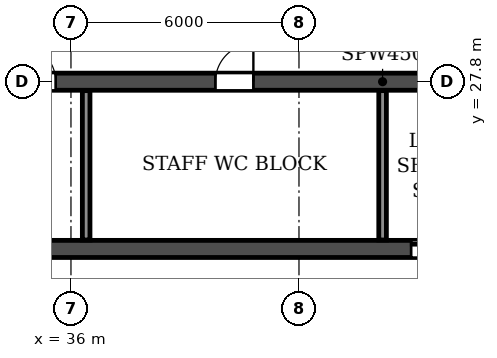
"""IFC4 building model, lengths in metres.
Left out: names, types, materials, properties, quantities, classifications, styles, units other than length and angle.
Written with IfcOpenShell. Run it as: python <this file> out.ifc"""

import sys

from ifc_helpers import new_model, si_unit, direction, frame, frame_2d, origin, place, context, subcontext, project, spatial, rectangle, extrude, element, fill, save


model = new_model("IFC4")
c1 = context("Model", 3, precision=1e-05, world=origin(), true_north=direction((0.0, 1.0)))
c2 = subcontext(c1, "Body", "Model", "MODEL_VIEW")
j1 = project(units=[si_unit("LENGTHUNIT", "METRE"), si_unit("PLANEANGLEUNIT", "RADIAN")], contexts=[c1])
p1 = place(None, origin())
s1 = spatial("IfcSite", under=j1, at=p1, CompositionType="ELEMENT")
p2 = place(p1, origin())
s2 = spatial("IfcBuilding", under=s1, at=p2, CompositionType="ELEMENT")
p3 = place(p2, frame((0.0, 0.0, 15.0)))
s3 = spatial("IfcBuildingStorey", under=s2, at=p3, CompositionType="ELEMENT", Elevation=15.0)
p4 = place(p3, frame((18.0, 27.8, 0.0), z_axis=(0.0, 0.0, 1.0), x_axis=(1.0, 0.0, 0.0)))
e1 = element("IfcWall", 1, at=p4, inside=s3, PredefinedType="SOLIDWALL", context=c2, shape_type="SweptSolid", body=[
    extrude(rectangle(XDim=66.0, YDim=0.45, at=frame_2d((33.0, 0.0))), origin(), (0.0, 0.0, 1.0), 3.92),
])
p5 = place(p4, frame((0.9, 0.0, 0.0)))
e2 = element("IfcOpeningElement", 2, at=p5, cuts=e1, PredefinedType="OPENING", context=c2, shape_type="SweptSolid", body=[
    extrude(rectangle(XDim=1.0, YDim=2.1, at=frame_2d((0.5, 1.05))), frame((0.0, 0.235, 0.0), z_axis=(0.0, -1.0, 0.0), x_axis=(1.0, 0.0, 0.0)), (0.0, 0.0, 1.0), 0.47),
])
p6 = place(p4, frame((4.25, 0.0, 0.0)))
e3 = element("IfcOpeningElement", 3, at=p6, cuts=e1, PredefinedType="OPENING", context=c2, shape_type="SweptSolid", body=[
    extrude(rectangle(XDim=0.9, YDim=2.1, at=frame_2d((0.45, 1.05))), frame((0.0, 0.235, 0.0), z_axis=(0.0, -1.0, 0.0), x_axis=(1.0, 0.0, 0.0)), (0.0, 0.0, 1.0), 0.47),
])
p7 = place(p4, frame((8.85, 0.0, 0.0)))
e4 = element("IfcOpeningElement", 4, at=p7, cuts=e1, PredefinedType="OPENING", context=c2, shape_type="SweptSolid", body=[
    extrude(rectangle(XDim=0.9, YDim=2.1, at=frame_2d((0.45, 1.05))), frame((0.0, 0.235, 0.0), z_axis=(0.0, -1.0, 0.0), x_axis=(1.0, 0.0, 0.0)), (0.0, 0.0, 1.0), 0.47),
])
p8 = place(p4, frame((13.45, 0.0, 0.0)))
e5 = element("IfcOpeningElement", 5, at=p8, cuts=e1, PredefinedType="OPENING", context=c2, shape_type="SweptSolid", body=[
    extrude(rectangle(XDim=0.9, YDim=2.1, at=frame_2d((0.45, 1.05))), frame((0.0, 0.235, 0.0), z_axis=(0.0, -1.0, 0.0), x_axis=(1.0, 0.0, 0.0)), (0.0, 0.0, 1.0), 0.47),
])
p9 = place(p4, frame((16.6, 0.0, 0.0)))
e6 = element("IfcOpeningElement", 6, at=p9, cuts=e1, PredefinedType="OPENING", context=c2, shape_type="SweptSolid", body=[
    extrude(rectangle(XDim=1.0, YDim=2.1, at=frame_2d((0.5, 1.05))), frame((0.0, 0.235, 0.0), z_axis=(0.0, -1.0, 0.0), x_axis=(1.0, 0.0, 0.0)), (0.0, 0.0, 1.0), 0.47),
])
p10 = place(p4, frame((21.8, 0.0, 0.0)))
e7 = element("IfcOpeningElement", 7, at=p10, cuts=e1, PredefinedType="OPENING", context=c2, shape_type="SweptSolid", body=[
    extrude(rectangle(XDim=1.0, YDim=2.1, at=frame_2d((0.5, 1.05))), frame((0.0, 0.235, 0.0), z_axis=(0.0, -1.0, 0.0), x_axis=(1.0, 0.0, 0.0)), (0.0, 0.0, 1.0), 0.47),
])
p11 = place(p4, frame((29.6, 0.0, 0.0)))
e8 = element("IfcOpeningElement", 8, at=p11, cuts=e1, PredefinedType="OPENING", context=c2, shape_type="SweptSolid", body=[
    extrude(rectangle(XDim=1.0, YDim=2.1, at=frame_2d((0.5, 1.05))), frame((0.0, 0.235, 0.0), z_axis=(0.0, -1.0, 0.0), x_axis=(1.0, 0.0, 0.0)), (0.0, 0.0, 1.0), 0.47),
])
p12 = place(p4, frame((32.5, 0.0, 0.0)))
e9 = element("IfcOpeningElement", 9, at=p12, cuts=e1, PredefinedType="OPENING", context=c2, shape_type="SweptSolid", body=[
    extrude(rectangle(XDim=1.0, YDim=2.1, at=frame_2d((0.5, 1.05))), frame((0.0, 0.235, 0.0), z_axis=(0.0, -1.0, 0.0), x_axis=(1.0, 0.0, 0.0)), (0.0, 0.0, 1.0), 0.47),
])
p13 = place(p4, frame((35.4, 0.0, 0.0)))
e10 = element("IfcOpeningElement", 10, at=p13, cuts=e1, PredefinedType="OPENING", context=c2, shape_type="SweptSolid", body=[
    extrude(rectangle(XDim=1.0, YDim=2.1, at=frame_2d((0.5, 1.05))), frame((0.0, 0.235, 0.0), z_axis=(0.0, -1.0, 0.0), x_axis=(1.0, 0.0, 0.0)), (0.0, 0.0, 1.0), 0.47),
])
p14 = place(p4, frame((39.3, 0.0, 0.0)))
e11 = element("IfcOpeningElement", 11, at=p14, cuts=e1, PredefinedType="OPENING", context=c2, shape_type="SweptSolid", body=[
    extrude(rectangle(XDim=1.0, YDim=2.1, at=frame_2d((0.5, 1.05))), frame((0.0, 0.235, 0.0), z_axis=(0.0, -1.0, 0.0), x_axis=(1.0, 0.0, 0.0)), (0.0, 0.0, 1.0), 0.47),
])
p15 = place(p4, frame((43.2, 0.0, 0.0)))
e12 = element("IfcOpeningElement", 12, at=p15, cuts=e1, PredefinedType="OPENING", context=c2, shape_type="SweptSolid", body=[
    extrude(rectangle(XDim=1.0, YDim=2.1, at=frame_2d((0.5, 1.05))), frame((0.0, 0.235, 0.0), z_axis=(0.0, -1.0, 0.0), x_axis=(1.0, 0.0, 0.0)), (0.0, 0.0, 1.0), 0.47),
])
p16 = place(p4, frame((45.8, 0.0, 0.0)))
e13 = element("IfcOpeningElement", 13, at=p16, cuts=e1, PredefinedType="OPENING", context=c2, shape_type="SweptSolid", body=[
    extrude(rectangle(XDim=1.0, YDim=2.1, at=frame_2d((0.5, 1.05))), frame((0.0, 0.235, 0.0), z_axis=(0.0, -1.0, 0.0), x_axis=(1.0, 0.0, 0.0)), (0.0, 0.0, 1.0), 0.47),
])
p17 = place(p4, frame((48.4, 0.0, 0.0)))
e14 = element("IfcOpeningElement", 14, at=p17, cuts=e1, PredefinedType="OPENING", context=c2, shape_type="SweptSolid", body=[
    extrude(rectangle(XDim=1.0, YDim=2.1, at=frame_2d((0.5, 1.05))), frame((0.0, 0.235, 0.0), z_axis=(0.0, -1.0, 0.0), x_axis=(1.0, 0.0, 0.0)), (0.0, 0.0, 1.0), 0.47),
])
p18 = place(p4, frame((51.65, 0.0, 0.0)))
e15 = element("IfcOpeningElement", 15, at=p18, cuts=e1, PredefinedType="OPENING", context=c2, shape_type="SweptSolid", body=[
    extrude(rectangle(XDim=0.9, YDim=2.1, at=frame_2d((0.45, 1.05))), frame((0.0, 0.235, 0.0), z_axis=(0.0, -1.0, 0.0), x_axis=(1.0, 0.0, 0.0)), (0.0, 0.0, 1.0), 0.47),
])
p19 = place(p4, frame((56.2, 0.0, 0.0)))
e16 = element("IfcOpeningElement", 16, at=p19, cuts=e1, PredefinedType="OPENING", context=c2, shape_type="SweptSolid", body=[
    extrude(rectangle(XDim=1.0, YDim=2.1, at=frame_2d((0.5, 1.05))), frame((0.0, 0.235, 0.0), z_axis=(0.0, -1.0, 0.0), x_axis=(1.0, 0.0, 0.0)), (0.0, 0.0, 1.0), 0.47),
])
p20 = place(p4, frame((60.85, 0.0, 0.0)))
e17 = element("IfcOpeningElement", 17, at=p20, cuts=e1, PredefinedType="OPENING", context=c2, shape_type="SweptSolid", body=[
    extrude(rectangle(XDim=0.9, YDim=2.1, at=frame_2d((0.45, 1.05))), frame((0.0, 0.235, 0.0), z_axis=(0.0, -1.0, 0.0), x_axis=(1.0, 0.0, 0.0)), (0.0, 0.0, 1.0), 0.47),
])
p21 = place(p4, frame((64.1, 0.0, 0.0)))
e18 = element("IfcOpeningElement", 18, at=p21, cuts=e1, PredefinedType="OPENING", context=c2, shape_type="SweptSolid", body=[
    extrude(rectangle(XDim=1.0, YDim=2.1, at=frame_2d((0.5, 1.05))), frame((0.0, 0.235, 0.0), z_axis=(0.0, -1.0, 0.0), x_axis=(1.0, 0.0, 0.0)), (0.0, 0.0, 1.0), 0.47),
])
p22 = place(p3, frame((33.925, 23.4, 0.0), z_axis=(0.0, 0.0, 1.0), x_axis=(1.0, 0.0, 0.0)))
e19 = element("IfcWall", 19, at=p22, inside=s3, PredefinedType="SOLIDWALL", context=c2, shape_type="SweptSolid", body=[
    extrude(rectangle(XDim=34.15, YDim=0.45, at=frame_2d((17.075, 0.0))), origin(), (0.0, 0.0, 1.0), 3.92),
])
p23 = place(p22, frame((16.175, 0.0, 0.0)))
e20 = element("IfcOpeningElement", 20, at=p23, cuts=e19, PredefinedType="OPENING", context=c2, shape_type="SweptSolid", body=[
    extrude(rectangle(XDim=1.8, YDim=2.1, at=frame_2d((0.9, 1.05))), frame((0.0, 0.235, 0.0), z_axis=(0.0, -1.0, 0.0), x_axis=(1.0, 0.0, 0.0)), (0.0, 0.0, 1.0), 0.47),
])
p24 = place(p22, frame((11.025, 0.0, 0.0)))
e21 = element("IfcOpeningElement", 21, at=p24, cuts=e19, PredefinedType="OPENING", context=c2, shape_type="SweptSolid", body=[
    extrude(rectangle(XDim=1.1, YDim=2.1, at=frame_2d((0.55, 1.05))), frame((0.0, 0.235, 0.0), z_axis=(0.0, -1.0, 0.0), x_axis=(1.0, 0.0, 0.0)), (0.0, 0.0, 1.0), 0.47),
])
p25 = place(p22, frame((29.825, 0.0, 0.0)))
e22 = element("IfcOpeningElement", 22, at=p25, cuts=e19, PredefinedType="OPENING", context=c2, shape_type="SweptSolid", body=[
    extrude(rectangle(XDim=1.1, YDim=2.1, at=frame_2d((0.55, 1.05))), frame((0.0, 0.235, 0.0), z_axis=(0.0, -1.0, 0.0), x_axis=(1.0, 0.0, 0.0)), (0.0, 0.0, 1.0), 0.47),
])
p26 = place(p22, frame((32.425, 0.0, 0.0)))
e23 = element("IfcOpeningElement", 23, at=p26, cuts=e19, PredefinedType="OPENING", context=c2, shape_type="SweptSolid", body=[
    extrude(rectangle(XDim=1.1, YDim=2.1, at=frame_2d((0.55, 1.05))), frame((0.0, 0.235, 0.0), z_axis=(0.0, -1.0, 0.0), x_axis=(1.0, 0.0, 0.0)), (0.0, 0.0, 1.0), 0.47),
])
for number, where, z_axis, x_axis in (
    (24, (36.4, 23.635, 0.0), (0.0, 0.0, 1.0), (0.0, 1.0, 0.0)),
    (25, (44.2, 23.635, 0.0), (0.0, 0.0, 1.0), (0.0, 1.0, 0.0)),
):
    element("IfcWall", number, at=place(p3, frame(where, z_axis=z_axis, x_axis=x_axis)), inside=s3, PredefinedType="PARTITIONING", context=c2, shape_type="SweptSolid", body=[
        extrude(rectangle(XDim=3.93, YDim=0.2, at=frame_2d((1.965, 0.0))), origin(), (0.0, 0.0, 1.0), 3.92),
    ])
p27 = place(p9, origin())
e26 = element("IfcDoor", 26, at=p27, inside=s3, OperationType="SINGLE_SWING_LEFT", PredefinedType="DOOR", context=c2, shape_type="SweptSolid", body=[
    extrude(rectangle(XDim=1.0, YDim=2.1, at=frame_2d((0.5, 1.05))), frame((0.0, 0.025, 0.0), z_axis=(0.0, -1.0, 0.0), x_axis=(1.0, 0.0, 0.0)), (0.0, 0.0, 1.0), 0.05),
])
fill(e6, e26)
p28 = place(p10, origin())
e27 = element("IfcDoor", 27, at=p28, inside=s3, OperationType="SINGLE_SWING_RIGHT", PredefinedType="DOOR", context=c2, shape_type="SweptSolid", body=[
    extrude(rectangle(XDim=1.0, YDim=2.1, at=frame_2d((0.5, 1.05))), frame((0.0, 0.025, 0.0), z_axis=(0.0, -1.0, 0.0), x_axis=(1.0, 0.0, 0.0)), (0.0, 0.0, 1.0), 0.05),
])
fill(e7, e27)
p29 = place(p24, origin())
e28 = element("IfcDoor", 28, at=p29, inside=s3, OperationType="DOUBLE_DOOR_SLIDING", PredefinedType="DOOR", context=c2, shape_type="SweptSolid", body=[
    extrude(rectangle(XDim=1.1, YDim=2.1, at=frame_2d((0.55, 1.05))), frame((0.0, 0.025, 0.0), z_axis=(0.0, -1.0, 0.0), x_axis=(1.0, 0.0, 0.0)), (0.0, 0.0, 1.0), 0.05),
])
fill(e21, e28)
save(model, sys.argv[1])
